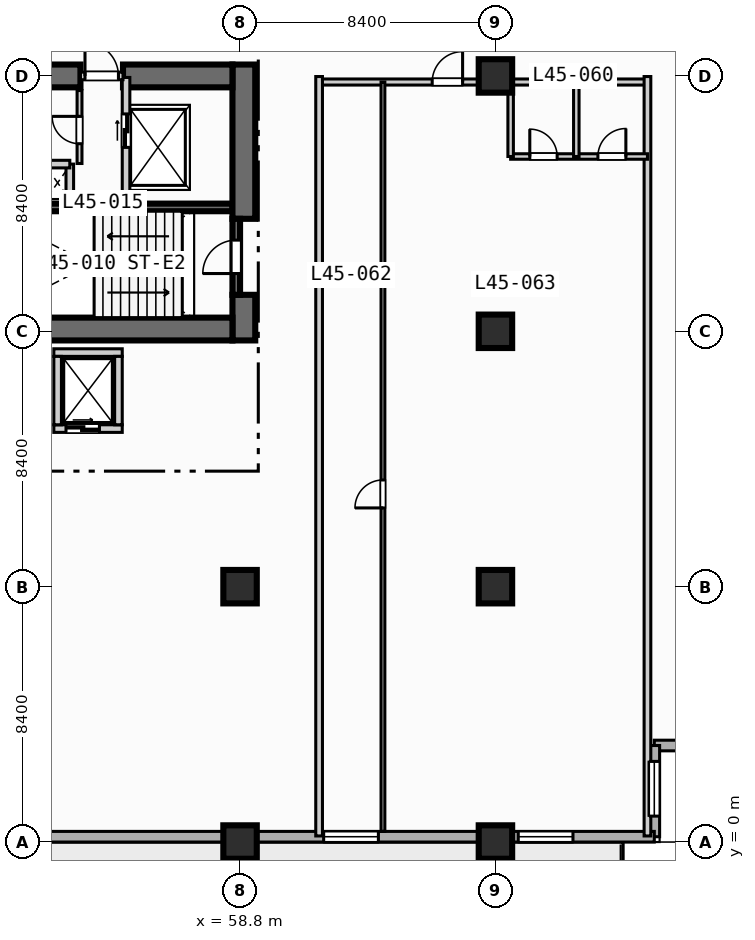
"""IFC4 building model, lengths in metres.
Left out: names, types, materials, properties, quantities, classifications, styles, units other than length and angle.
Written with IfcOpenShell. Run it as: python <this file> out.ifc"""

import sys

from ifc_helpers import new_model, si_unit, direction, frame, frame_2d, origin, origin_2d, place, context, subcontext, project, spatial, rectangle, extrude, element, fill, save


model = new_model("IFC4")
c1 = context("Model", 3, precision=1e-05, world=origin(), true_north=direction((0.0, 1.0)))
c2 = subcontext(c1, "Body", "Model", "MODEL_VIEW")
j1 = project(units=[si_unit("LENGTHUNIT", "METRE"), si_unit("PLANEANGLEUNIT", "RADIAN")], contexts=[c1])
p1 = place(None, origin())
s1 = spatial("IfcSite", under=j1, at=p1, CompositionType="ELEMENT")
p2 = place(p1, origin())
s2 = spatial("IfcBuilding", under=s1, at=p2, CompositionType="ELEMENT")
p3 = place(p2, frame((0.0, 0.0, 186.5)))
s3 = spatial("IfcBuildingStorey", under=s2, at=p3, CompositionType="ELEMENT", Elevation=186.5)
p4 = place(p3, frame((50.5, 20.875, 0.0), z_axis=(0.0, 0.0, 1.0), x_axis=(1.0, 0.0, 0.0)))
e1 = element("IfcWall", 1, at=p4, inside=s3, PredefinedType="SOLIDWALL", context=c2, shape_type="SweptSolid", body=[
    extrude(rectangle(XDim=8.05, YDim=0.25, at=frame_2d((4.025, 0.0))), origin(), (0.0, 0.0, 1.0), 3.47),
])
p5 = place(p3, frame((58.925, 16.5, 0.0), z_axis=(0.0, 0.0, 1.0), x_axis=(0.0, 1.0, 0.0)))
e2 = element("IfcWall", 2, at=p5, inside=s3, PredefinedType="SHEAR", context=c2, shape_type="SweptSolid", body=[
    extrude(rectangle(XDim=1.5, YDim=0.75, at=frame_2d((0.75, 0.0))), origin(), (0.0, 0.0, 1.0), 3.47),
])
p6 = place(p3, frame((58.925, 20.5, 0.0), z_axis=(0.0, 0.0, 1.0), x_axis=(0.0, 1.0, 0.0)))
e3 = element("IfcWall", 3, at=p6, inside=s3, PredefinedType="SHEAR", context=c2, shape_type="SweptSolid", body=[
    extrude(rectangle(XDim=5.075, YDim=0.75, at=frame_2d((2.538, 0.0))), origin(), (0.0, 0.0, 1.0), 3.47),
])
p7 = place(p3, frame((42.2, 16.875, 0.0), z_axis=(0.0, 0.0, 1.0), x_axis=(1.0, 0.0, 0.0)))
e4 = element("IfcWall", 4, at=p7, inside=s3, PredefinedType="SHEAR", context=c2, shape_type="SweptSolid", body=[
    extrude(rectangle(XDim=16.35, YDim=0.75, at=frame_2d((8.175, 0.0))), origin(), (0.0, 0.0, 1.0), 3.47),
])
p8 = place(p3, frame((52.28, 25.2, 0.0), z_axis=(0.0, 0.0, 1.0), x_axis=(1.0, 0.0, 0.0)))
e5 = element("IfcWall", 5, at=p8, inside=s3, PredefinedType="SHEAR", context=c2, shape_type="SweptSolid", body=[
    extrude(rectangle(XDim=1.27, YDim=0.75, at=frame_2d((0.635, 0.0))), origin(), (0.0, 0.0, 1.0), 3.47),
])
p9 = place(p3, frame((54.95, 25.2, 0.0), z_axis=(0.0, 0.0, 1.0), x_axis=(1.0, 0.0, 0.0)))
e6 = element("IfcWall", 6, at=p9, inside=s3, PredefinedType="SHEAR", context=c2, shape_type="SweptSolid", body=[
    extrude(rectangle(XDim=3.6, YDim=0.75, at=frame_2d((1.8, 0.0))), origin(), (0.0, 0.0, 1.0), 3.47),
])
for number, where, z_axis, x_axis in (
    (7, (58.8, 0.0, 0.0), (0.0, 0.0, 1.0), (1.0, 0.0, 0.0)),
    (8, (58.8, 8.4, 0.0), (0.0, 0.0, 1.0), (1.0, 0.0, 0.0)),
    (9, (67.2, 0.0, 0.0), (0.0, 0.0, 1.0), (1.0, 0.0, 0.0)),
    (10, (67.2, 8.4, 0.0), (0.0, 0.0, 1.0), (1.0, 0.0, 0.0)),
    (11, (67.2, 16.8, 0.0), (0.0, 0.0, 1.0), (1.0, 0.0, 0.0)),
    (12, (67.2, 25.2, 0.0), (0.0, 0.0, 1.0), (1.0, 0.0, 0.0)),
):
    element("IfcColumn", number, at=place(p3, frame(where, z_axis=z_axis, x_axis=x_axis)), inside=s3, PredefinedType="COLUMN", context=c2, shape_type="SweptSolid", body=[
        extrude(rectangle(XDim=1.1, YDim=1.1, at=origin_2d()), origin(), (0.0, 0.0, 1.0), 3.7),
    ])
p10 = place(p3, frame((75.425, 3.175, 0.0), z_axis=(0.0, 0.0, 1.0), x_axis=(-1.0, 0.0, 0.0)))
e13 = element("IfcWall", 13, at=p10, inside=s3, PredefinedType="STANDARD", context=c2, shape_type="SweptSolid", body=[
    extrude(rectangle(XDim=3.0, YDim=0.35, at=frame_2d((1.5, 0.0))), origin(), (0.0, 0.0, 1.0), 3.47),
])
p11 = place(p3, frame((72.425, 3.175, 0.0), z_axis=(0.0, 0.0, 1.0), x_axis=(0.0, -1.0, 0.0)))
e14 = element("IfcWall", 14, at=p11, inside=s3, PredefinedType="STANDARD", context=c2, shape_type="SweptSolid", body=[
    extrude(rectangle(XDim=3.0, YDim=0.35, at=frame_2d((1.5, 0.0))), origin(), (0.0, 0.0, 1.0), 3.47),
])
p12 = place(p11, frame((0.522, 0.0, 0.85)))
e15 = element("IfcOpeningElement", 15, at=p12, cuts=e14, PredefinedType="OPENING", context=c2, shape_type="SweptSolid", body=[
    extrude(rectangle(XDim=1.8, YDim=1.8, at=frame_2d((0.9, 0.9))), frame((0.0, 0.185, 0.0), z_axis=(0.0, -1.0, 0.0), x_axis=(1.0, 0.0, 0.0)), (0.0, 0.0, 1.0), 0.37),
])
p13 = place(p3, frame((72.425, 0.175, 0.0), z_axis=(0.0, 0.0, 1.0), x_axis=(-1.0, 0.0, 0.0)))
e16 = element("IfcWall", 16, at=p13, inside=s3, PredefinedType="STANDARD", context=c2, shape_type="SweptSolid", body=[
    extrude(rectangle(XDim=69.25, YDim=0.35, at=frame_2d((34.625, 0.0))), origin(), (0.0, 0.0, 1.0), 3.47),
])
p14 = place(p13, frame((50.725, 0.0, 0.0)))
e17 = element("IfcOpeningElement", 17, at=p14, cuts=e16, PredefinedType="OPENING", context=c2, shape_type="SweptSolid", body=[
    extrude(rectangle(XDim=1.4, YDim=2.2, at=frame_2d((0.7, 1.1))), frame((0.0, 0.185, 0.0), z_axis=(0.0, -1.0, 0.0), x_axis=(1.0, 0.0, 0.0)), (0.0, 0.0, 1.0), 0.37),
])
p15 = place(p13, frame((58.625, 0.0, 0.85)))
e18 = element("IfcOpeningElement", 18, at=p15, cuts=e16, PredefinedType="OPENING", context=c2, shape_type="SweptSolid", body=[
    extrude(rectangle(XDim=2.4, YDim=1.95, at=frame_2d((1.2, 0.975))), frame((0.0, 0.185, 0.0), z_axis=(0.0, -1.0, 0.0), x_axis=(1.0, 0.0, 0.0)), (0.0, 0.0, 1.0), 0.37),
])
p16 = place(p13, frame((41.825, 0.0, 0.85)))
e19 = element("IfcOpeningElement", 19, at=p16, cuts=e16, PredefinedType="OPENING", context=c2, shape_type="SweptSolid", body=[
    extrude(rectangle(XDim=2.4, YDim=1.95, at=frame_2d((1.2, 0.975))), frame((0.0, 0.185, 0.0), z_axis=(0.0, -1.0, 0.0), x_axis=(1.0, 0.0, 0.0)), (0.0, 0.0, 1.0), 0.37),
])
p17 = place(p13, frame((33.725, 0.0, 0.85)))
e20 = element("IfcOpeningElement", 20, at=p17, cuts=e16, PredefinedType="OPENING", context=c2, shape_type="SweptSolid", body=[
    extrude(rectangle(XDim=1.8, YDim=1.8, at=frame_2d((0.9, 0.9))), frame((0.0, 0.185, 0.0), z_axis=(0.0, -1.0, 0.0), x_axis=(1.0, 0.0, 0.0)), (0.0, 0.0, 1.0), 0.37),
])
p18 = place(p13, frame((25.025, 0.0, 0.85)))
e21 = element("IfcOpeningElement", 21, at=p18, cuts=e16, PredefinedType="OPENING", context=c2, shape_type="SweptSolid", body=[
    extrude(rectangle(XDim=2.4, YDim=1.95, at=frame_2d((1.2, 0.975))), frame((0.0, 0.185, 0.0), z_axis=(0.0, -1.0, 0.0), x_axis=(1.0, 0.0, 0.0)), (0.0, 0.0, 1.0), 0.37),
])
p19 = place(p13, frame((67.075, 0.0, 0.85)))
e22 = element("IfcOpeningElement", 22, at=p19, cuts=e16, PredefinedType="OPENING", context=c2, shape_type="SweptSolid", body=[
    extrude(rectangle(XDim=1.8, YDim=1.8, at=frame_2d((0.9, 0.9))), frame((0.0, 0.185, 0.0), z_axis=(0.0, -1.0, 0.0), x_axis=(1.0, 0.0, 0.0)), (0.0, 0.0, 1.0), 0.37),
])
p20 = place(p13, frame((56.39, 0.0, 0.85)))
e23 = element("IfcOpeningElement", 23, at=p20, cuts=e16, PredefinedType="OPENING", context=c2, shape_type="SweptSolid", body=[
    extrude(rectangle(XDim=0.72, YDim=1.8, at=frame_2d((0.36, 0.9))), frame((0.0, 0.185, 0.0), z_axis=(0.0, -1.0, 0.0), x_axis=(1.0, 0.0, 0.0)), (0.0, 0.0, 1.0), 0.37),
])
p21 = place(p13, frame((9.075, 0.0, 0.85)))
e24 = element("IfcOpeningElement", 24, at=p21, cuts=e16, PredefinedType="OPENING", context=c2, shape_type="SweptSolid", body=[
    extrude(rectangle(XDim=1.8, YDim=1.8, at=frame_2d((0.9, 0.9))), frame((0.0, 0.185, 0.0), z_axis=(0.0, -1.0, 0.0), x_axis=(1.0, 0.0, 0.0)), (0.0, 0.0, 1.0), 0.37),
])
p22 = place(p13, frame((2.675, 0.0, 0.85)))
e25 = element("IfcOpeningElement", 25, at=p22, cuts=e16, PredefinedType="OPENING", context=c2, shape_type="SweptSolid", body=[
    extrude(rectangle(XDim=1.8, YDim=1.8, at=frame_2d((0.9, 0.9))), frame((0.0, 0.185, 0.0), z_axis=(0.0, -1.0, 0.0), x_axis=(1.0, 0.0, 0.0)), (0.0, 0.0, 1.0), 0.37),
])
p23 = place(p3, frame((58.675, 18.0, 0.0), z_axis=(0.0, 0.0, 1.0), x_axis=(0.0, 1.0, 0.0)))
e26 = element("IfcWall", 26, at=p23, inside=s3, PredefinedType="SOLIDWALL", context=c2, shape_type="SweptSolid", body=[
    extrude(rectangle(XDim=2.5, YDim=0.25, at=frame_2d((1.25, 0.0))), origin(), (0.0, 0.0, 1.0), 3.47),
])
p24 = place(p23, frame((0.7, 0.0, 0.0)))
e27 = element("IfcOpeningElement", 27, at=p24, cuts=e26, PredefinedType="OPENING", context=c2, shape_type="SweptSolid", body=[
    extrude(rectangle(XDim=1.1, YDim=2.15, at=frame_2d((0.55, 1.075))), frame((0.0, 0.135, 0.0), z_axis=(0.0, -1.0, 0.0), x_axis=(1.0, 0.0, 0.0)), (0.0, 0.0, 1.0), 0.27),
])
p25 = place(p3, frame((55.05, 21.0, 0.0), z_axis=(0.0, 0.0, 1.0), x_axis=(0.0, 1.0, 0.0)))
e28 = element("IfcWall", 28, at=p25, inside=s3, PredefinedType="SOLIDWALL", context=c2, shape_type="SweptSolid", body=[
    extrude(rectangle(XDim=4.15, YDim=0.25, at=frame_2d((2.075, 0.0))), origin(), (0.0, 0.0, 1.0), 3.47),
])
p26 = place(p25, frame((1.85, 0.0, 0.0)))
e29 = element("IfcOpeningElement", 29, at=p26, cuts=e28, PredefinedType="OPENING", context=c2, shape_type="SweptSolid", body=[
    extrude(rectangle(XDim=1.1, YDim=2.15, at=frame_2d((0.55, 1.075))), frame((0.0, 0.135, 0.0), z_axis=(0.0, -1.0, 0.0), x_axis=(1.0, 0.0, 0.0)), (0.0, 0.0, 1.0), 0.27),
])
p27 = place(p3, frame((53.55, 25.2, 0.0), z_axis=(0.0, 0.0, 1.0), x_axis=(1.0, 0.0, 0.0)))
e30 = element("IfcWall", 30, at=p27, inside=s3, PredefinedType="SOLIDWALL", context=c2, shape_type="SweptSolid", body=[
    extrude(rectangle(XDim=1.4, YDim=0.25, at=frame_2d((0.7, 0.0))), origin(), (0.0, 0.0, 1.0), 3.47),
])
p28 = place(p27, frame((0.15, 0.0, 0.0)))
e31 = element("IfcOpeningElement", 31, at=p28, cuts=e30, PredefinedType="OPENING", context=c2, shape_type="SweptSolid", body=[
    extrude(rectangle(XDim=1.1, YDim=2.15, at=frame_2d((0.55, 1.075))), frame((0.0, 0.135, 0.0), z_axis=(0.0, -1.0, 0.0), x_axis=(1.0, 0.0, 0.0)), (0.0, 0.0, 1.0), 0.27),
])
p29 = place(p3, frame((53.2, 21.0, 0.0), z_axis=(0.0, 0.0, 1.0), x_axis=(0.0, 1.0, 0.0)))
e32 = element("IfcWall", 32, at=p29, inside=s3, PredefinedType="SOLIDWALL", context=c2, shape_type="SweptSolid", body=[
    extrude(rectangle(XDim=1.3, YDim=0.25, at=frame_2d((0.65, 0.0))), origin(), (0.0, 0.0, 1.0), 3.47),
])
p30 = place(p3, frame((52.36, 22.3, 0.0), z_axis=(0.0, 0.0, 1.0), x_axis=(1.0, 0.0, 0.0)))
e33 = element("IfcWall", 33, at=p30, inside=s3, PredefinedType="SOLIDWALL", context=c2, shape_type="SweptSolid", body=[
    extrude(rectangle(XDim=0.84, YDim=0.25, at=frame_2d((0.42, 0.0))), origin(), (0.0, 0.0, 1.0), 3.47),
])
p31 = place(p3, frame((53.52, 22.32, 0.0), z_axis=(0.0, 0.0, 1.0), x_axis=(0.0, 1.0, 0.0)))
e34 = element("IfcWall", 34, at=p31, inside=s3, PredefinedType="PARTITIONING", context=c2, shape_type="SweptSolid", body=[
    extrude(rectangle(XDim=2.4, YDim=0.16, at=frame_2d((1.2, 0.0))), origin(), (0.0, 0.0, 1.0), 3.47),
])
p32 = place(p31, frame((0.65, 0.0, 0.0)))
e35 = element("IfcOpeningElement", 35, at=p32, cuts=e34, PredefinedType="OPENING", context=c2, shape_type="SweptSolid", body=[
    extrude(rectangle(XDim=0.9, YDim=2.1, at=frame_2d((0.45, 1.05))), frame((0.0, 0.09, 0.0), z_axis=(0.0, -1.0, 0.0), x_axis=(1.0, 0.0, 0.0)), (0.0, 0.0, 1.0), 0.18),
])
p33 = place(p3, frame((52.675, 13.6, 0.0), z_axis=(0.0, 0.0, 1.0), x_axis=(1.0, 0.0, 0.0)))
e36 = element("IfcWall", 36, at=p33, inside=s3, PredefinedType="SOLIDWALL", context=c2, shape_type="SweptSolid", body=[
    extrude(rectangle(XDim=2.25, YDim=0.25, at=frame_2d((1.125, 0.0))), origin(), (0.0, 0.0, 1.0), 3.47),
])
p34 = place(p33, frame((0.4, 0.0, 0.0)))
e37 = element("IfcOpeningElement", 37, at=p34, cuts=e36, PredefinedType="OPENING", context=c2, shape_type="SweptSolid", body=[
    extrude(rectangle(XDim=1.1, YDim=2.15, at=frame_2d((0.55, 1.075))), frame((0.0, 0.135, 0.0), z_axis=(0.0, -1.0, 0.0), x_axis=(1.0, 0.0, 0.0)), (0.0, 0.0, 1.0), 0.27),
])
for number, where, z_axis, x_axis in (
    (38, (52.675, 16.1, 0.0), (0.0, 0.0, 1.0), (1.0, 0.0, 0.0)),
    (39, (52.8, 13.725, 0.0), (0.0, 0.0, 1.0), (0.0, 1.0, 0.0)),
    (40, (54.8, 13.725, 0.0), (0.0, 0.0, 1.0), (0.0, 1.0, 0.0)),
):
    element("IfcWall", number, at=place(p3, frame(where, z_axis=z_axis, x_axis=x_axis)), inside=s3, PredefinedType="SOLIDWALL", context=c2, shape_type="SweptSolid", body=[
        extrude(rectangle(XDim=2.25, YDim=0.25, at=frame_2d((1.125, 0.0))), origin(), (0.0, 0.0, 1.0), 3.47),
    ])
p35 = place(p3, frame((61.4, 25.0, 0.0), z_axis=(0.0, 0.0, 1.0), x_axis=(1.0, 0.0, 0.0)))
e41 = element("IfcWall", 41, at=p35, inside=s3, PredefinedType="PARTITIONING", context=c2, shape_type="SweptSolid", body=[
    extrude(rectangle(XDim=10.8, YDim=0.2, at=frame_2d((5.4, 0.0))), origin(), (0.0, 0.0, 1.0), 2.82),
])
p36 = place(p35, frame((3.72, 0.0, 0.0)))
e42 = element("IfcOpeningElement", 42, at=p36, cuts=e41, PredefinedType="OPENING", context=c2, shape_type="SweptSolid", body=[
    extrude(rectangle(XDim=1.0, YDim=2.15, at=frame_2d((0.5, 1.075))), frame((0.0, 0.11, 0.0), z_axis=(0.0, -1.0, 0.0), x_axis=(1.0, 0.0, 0.0)), (0.0, 0.0, 1.0), 0.22),
])
for number, where, z_axis, x_axis in (
    (43, (61.4, 0.2, 0.0), (0.0, 0.0, 1.0), (0.0, 1.0, 0.0)),
    (44, (72.2, 0.2, 0.0), (0.0, 0.0, 1.0), (0.0, 1.0, 0.0)),
):
    element("IfcWall", number, at=place(p3, frame(where, z_axis=z_axis, x_axis=x_axis)), inside=s3, PredefinedType="PARTITIONING", context=c2, shape_type="SweptSolid", body=[
        extrude(rectangle(XDim=24.98, YDim=0.22, at=frame_2d((12.49, 0.0))), origin(), (0.0, 0.0, 1.0), 3.47),
    ])
p37 = place(p3, frame((67.7, 22.55, 0.0), z_axis=(0.0, 0.0, 1.0), x_axis=(1.0, 0.0, 0.0)))
e45 = element("IfcWall", 45, at=p37, inside=s3, PredefinedType="PLUMBINGWALL", context=c2, shape_type="SweptSolid", body=[
    extrude(rectangle(XDim=4.5, YDim=0.18, at=frame_2d((2.25, 0.0))), origin(), (0.0, 0.0, 1.0), 3.47),
])
p38 = place(p37, frame((0.63, 0.0, 0.0)))
e46 = element("IfcOpeningElement", 46, at=p38, cuts=e45, PredefinedType="OPENING", context=c2, shape_type="SweptSolid", body=[
    extrude(rectangle(XDim=0.9, YDim=2.1, at=frame_2d((0.45, 1.05))), frame((0.0, 0.1, 0.0), z_axis=(0.0, -1.0, 0.0), x_axis=(1.0, 0.0, 0.0)), (0.0, 0.0, 1.0), 0.2),
])
p39 = place(p37, frame((2.87, 0.0, 0.0)))
e47 = element("IfcOpeningElement", 47, at=p39, cuts=e45, PredefinedType="OPENING", context=c2, shape_type="SweptSolid", body=[
    extrude(rectangle(XDim=0.92, YDim=2.1, at=frame_2d((0.46, 1.05))), frame((0.0, 0.1, 0.0), z_axis=(0.0, -1.0, 0.0), x_axis=(1.0, 0.0, 0.0)), (0.0, 0.0, 1.0), 0.2),
])
for number, where, z_axis, x_axis in (
    (48, (67.7, 22.55, 0.0), (0.0, 0.0, 1.0), (0.0, 1.0, 0.0)),
    (49, (69.86, 22.55, 0.0), (0.0, 0.0, 1.0), (0.0, 1.0, 0.0)),
):
    element("IfcWall", number, at=place(p3, frame(where, z_axis=z_axis, x_axis=x_axis)), inside=s3, PredefinedType="PLUMBINGWALL", context=c2, shape_type="SweptSolid", body=[
        extrude(rectangle(XDim=2.45, YDim=0.18, at=frame_2d((1.225, 0.0))), origin(), (0.0, 0.0, 1.0), 3.47),
    ])
p40 = place(p3, frame((63.5, 0.35, 0.0), z_axis=(0.0, 0.0, 1.0), x_axis=(0.0, 1.0, 0.0)))
e50 = element("IfcWall", 50, at=p40, inside=s3, PredefinedType="PARTITIONING", context=c2, shape_type="SweptSolid", body=[
    extrude(rectangle(XDim=24.65, YDim=0.125, at=frame_2d((12.325, 0.0))), origin(), (0.0, 0.0, 1.0), 3.47),
])
p41 = place(p40, frame((10.64, 0.0, 0.0)))
e51 = element("IfcOpeningElement", 51, at=p41, cuts=e50, PredefinedType="OPENING", context=c2, shape_type="SweptSolid", body=[
    extrude(rectangle(XDim=0.92, YDim=2.1, at=frame_2d((0.46, 1.05))), frame((0.0, 0.073, 0.0), z_axis=(0.0, -1.0, 0.0), x_axis=(1.0, 0.0, 0.0)), (0.0, 0.0, 1.0), 0.145),
])
p42 = place(p12, origin())
e52 = element("IfcWindow", 52, at=p42, inside=s3, PartitioningType="SINGLE_PANEL", PredefinedType="WINDOW", context=c2, shape_type="SweptSolid", body=[
    extrude(rectangle(XDim=1.8, YDim=1.8, at=frame_2d((0.9, 0.9))), frame((0.0, 0.03, 0.0), z_axis=(0.0, -1.0, 0.0), x_axis=(1.0, 0.0, 0.0)), (0.0, 0.0, 1.0), 0.06),
])
fill(e15, e52)
p43 = place(p21, origin())
e53 = element("IfcWindow", 53, at=p43, inside=s3, PartitioningType="SINGLE_PANEL", PredefinedType="WINDOW", context=c2, shape_type="SweptSolid", body=[
    extrude(rectangle(XDim=1.8, YDim=1.8, at=frame_2d((0.9, 0.9))), frame((0.0, 0.03, 0.0), z_axis=(0.0, -1.0, 0.0), x_axis=(1.0, 0.0, 0.0)), (0.0, 0.0, 1.0), 0.06),
])
fill(e24, e53)
p44 = place(p22, origin())
e54 = element("IfcWindow", 54, at=p44, inside=s3, PartitioningType="SINGLE_PANEL", PredefinedType="WINDOW", context=c2, shape_type="SweptSolid", body=[
    extrude(rectangle(XDim=1.8, YDim=1.8, at=frame_2d((0.9, 0.9))), frame((0.0, 0.03, 0.0), z_axis=(0.0, -1.0, 0.0), x_axis=(1.0, 0.0, 0.0)), (0.0, 0.0, 1.0), 0.06),
])
fill(e25, e54)
p45 = place(p24, origin())
e55 = element("IfcDoor", 55, at=p45, inside=s3, OperationType="SINGLE_SWING_LEFT", PredefinedType="DOOR", context=c2, shape_type="SweptSolid", body=[
    extrude(rectangle(XDim=1.1, YDim=2.15, at=frame_2d((0.55, 1.075))), frame((0.0, 0.025, 0.0), z_axis=(0.0, -1.0, 0.0), x_axis=(1.0, 0.0, 0.0)), (0.0, 0.0, 1.0), 0.05),
])
fill(e27, e55)
p46 = place(p26, origin())
e56 = element("IfcDoor", 56, at=p46, inside=s3, OperationType="SLIDING_TO_LEFT", PredefinedType="DOOR", context=c2, shape_type="SweptSolid", body=[
    extrude(rectangle(XDim=1.1, YDim=2.15, at=frame_2d((0.55, 1.075))), frame((0.0, 0.025, 0.0), z_axis=(0.0, -1.0, 0.0), x_axis=(1.0, 0.0, 0.0)), (0.0, 0.0, 1.0), 0.05),
])
fill(e29, e56)
p47 = place(p28, origin())
e57 = element("IfcDoor", 57, at=p47, inside=s3, OperationType="SINGLE_SWING_LEFT", PredefinedType="DOOR", context=c2, shape_type="SweptSolid", body=[
    extrude(rectangle(XDim=1.1, YDim=2.15, at=frame_2d((0.55, 1.075))), frame((0.0, 0.025, 0.0), z_axis=(0.0, -1.0, 0.0), x_axis=(1.0, 0.0, 0.0)), (0.0, 0.0, 1.0), 0.05),
])
fill(e31, e57)
p48 = place(p32, origin())
e58 = element("IfcDoor", 58, at=p48, inside=s3, OperationType="SINGLE_SWING_RIGHT", PredefinedType="DOOR", context=c2, shape_type="SweptSolid", body=[
    extrude(rectangle(XDim=0.9, YDim=2.1, at=frame_2d((0.45, 1.05))), frame((0.0, 0.025, 0.0), z_axis=(0.0, -1.0, 0.0), x_axis=(1.0, 0.0, 0.0)), (0.0, 0.0, 1.0), 0.05),
])
fill(e35, e58)
p49 = place(p34, origin())
e59 = element("IfcDoor", 59, at=p49, inside=s3, OperationType="SLIDING_TO_LEFT", PredefinedType="DOOR", context=c2, shape_type="SweptSolid", body=[
    extrude(rectangle(XDim=1.1, YDim=2.15, at=frame_2d((0.55, 1.075))), frame((0.0, 0.025, 0.0), z_axis=(0.0, -1.0, 0.0), x_axis=(1.0, 0.0, 0.0)), (0.0, 0.0, 1.0), 0.05),
])
fill(e37, e59)
p50 = place(p36, origin())
e60 = element("IfcDoor", 60, at=p50, inside=s3, OperationType="SINGLE_SWING_RIGHT", PredefinedType="DOOR", context=c2, shape_type="SweptSolid", body=[
    extrude(rectangle(XDim=1.0, YDim=2.15, at=frame_2d((0.5, 1.075))), frame((0.0, 0.025, 0.0), z_axis=(0.0, -1.0, 0.0), x_axis=(1.0, 0.0, 0.0)), (0.0, 0.0, 1.0), 0.05),
])
fill(e42, e60)
p51 = place(p38, origin())
e61 = element("IfcDoor", 61, at=p51, inside=s3, OperationType="SINGLE_SWING_LEFT", PredefinedType="DOOR", context=c2, shape_type="SweptSolid", body=[
    extrude(rectangle(XDim=0.9, YDim=2.1, at=frame_2d((0.45, 1.05))), frame((0.0, 0.025, 0.0), z_axis=(0.0, -1.0, 0.0), x_axis=(1.0, 0.0, 0.0)), (0.0, 0.0, 1.0), 0.05),
])
fill(e46, e61)
p52 = place(p39, origin())
e62 = element("IfcDoor", 62, at=p52, inside=s3, OperationType="SINGLE_SWING_RIGHT", PredefinedType="DOOR", context=c2, shape_type="SweptSolid", body=[
    extrude(rectangle(XDim=0.92, YDim=2.1, at=frame_2d((0.46, 1.05))), frame((0.0, 0.025, 0.0), z_axis=(0.0, -1.0, 0.0), x_axis=(1.0, 0.0, 0.0)), (0.0, 0.0, 1.0), 0.05),
])
fill(e47, e62)
p53 = place(p41, origin())
e63 = element("IfcDoor", 63, at=p53, inside=s3, OperationType="SINGLE_SWING_LEFT", PredefinedType="DOOR", context=c2, shape_type="SweptSolid", body=[
    extrude(rectangle(XDim=0.92, YDim=2.1, at=frame_2d((0.46, 1.05))), frame((0.0, 0.025, 0.0), z_axis=(0.0, -1.0, 0.0), x_axis=(1.0, 0.0, 0.0)), (0.0, 0.0, 1.0), 0.05),
])
fill(e51, e63)
save(model, sys.argv[1])
